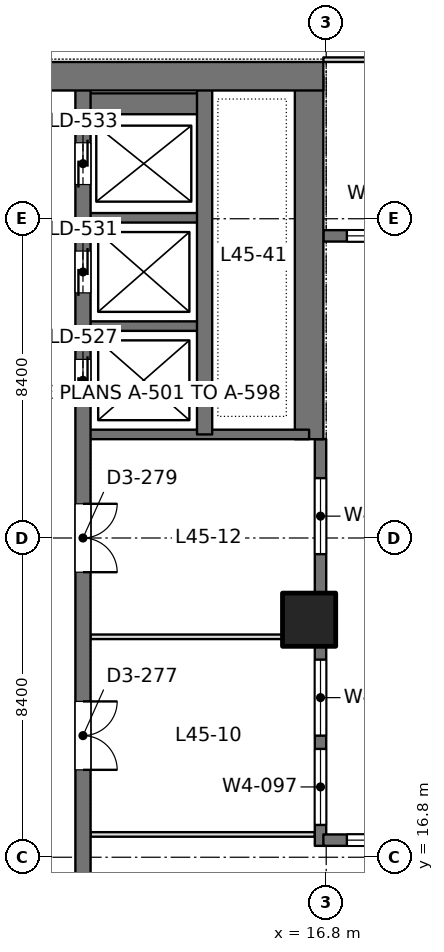
"""IFC4 building model, lengths in metres.
Left out: names, types, materials, properties, quantities, classifications, styles, units other than length and angle.
Written with IfcOpenShell. Run it as: python <this file> out.ifc"""

import sys

from ifc_helpers import new_model, si_unit, direction, frame, frame_2d, origin, origin_2d, place, context, subcontext, project, spatial, rectangle, extrude, element, fill, save


model = new_model("IFC4")
c1 = context("Model", 3, precision=1e-05, world=origin(), true_north=direction((0.0, 1.0)))
c2 = subcontext(c1, "Body", "Model", "MODEL_VIEW")
j1 = project(units=[si_unit("LENGTHUNIT", "METRE"), si_unit("PLANEANGLEUNIT", "RADIAN")], contexts=[c1])
p1 = place(None, origin())
s1 = spatial("IfcSite", under=j1, at=p1, CompositionType="ELEMENT")
p2 = place(p1, origin())
s2 = spatial("IfcBuilding", under=s1, at=p2, CompositionType="ELEMENT")
p3 = place(p2, frame((0.0, 0.0, 198.6)))
s3 = spatial("IfcBuildingStorey", under=s2, at=p3, CompositionType="ELEMENT", Elevation=198.6)
p4 = place(p3, frame((16.35, 23.05, 0.0), z_axis=(0.0, 0.0, 1.0), x_axis=(1.0, 0.0, 0.0)))
e1 = element("IfcColumn", 1, at=p4, inside=s3, PredefinedType="COLUMN", context=c2, shape_type="SweptSolid", body=[
    extrude(rectangle(XDim=1.4, YDim=1.4, at=origin_2d()), origin(), (0.0, 0.0, 1.0), 4.2),
])
p5 = place(p3, frame((-1.125, 37.35, 0.0), z_axis=(0.0, 0.0, 1.0), x_axis=(1.0, 0.0, 0.0)))
e2 = element("IfcWall", 2, at=p5, inside=s3, PredefinedType="SHEAR", context=c2, shape_type="SweptSolid", body=[
    extrude(rectangle(XDim=17.85, YDim=0.75, at=frame_2d((8.925, 0.0))), origin(), (0.0, 0.0, 1.0), 4.2),
])
p6 = place(p5, frame((8.875, 0.0, 0.0)))
e3 = element("IfcOpeningElement", 3, at=p6, cuts=e2, PredefinedType="OPENING", context=c2, shape_type="SweptSolid", body=[
    extrude(rectangle(XDim=1.8, YDim=2.4, at=frame_2d((0.9, 1.2))), frame((0.0, 0.385, 0.0), z_axis=(0.0, -1.0, 0.0), x_axis=(1.0, 0.0, 0.0)), (0.0, 0.0, 1.0), 0.77),
])
p7 = place(p3, frame((16.35, 27.8, 0.0), z_axis=(0.0, 0.0, 1.0), x_axis=(0.0, 1.0, 0.0)))
e4 = element("IfcWall", 4, at=p7, inside=s3, PredefinedType="SHEAR", context=c2, shape_type="SweptSolid", body=[
    extrude(rectangle(XDim=9.55, YDim=0.75, at=frame_2d((4.775, 0.0))), origin(), (0.0, 0.0, 1.0), 4.2),
])
p8 = place(p3, frame((10.4, 13.05, 0.0), z_axis=(0.0, 0.0, 1.0), x_axis=(0.0, 1.0, 0.0)))
e5 = element("IfcWall", 5, at=p8, inside=s3, PredefinedType="SHEAR", context=c2, shape_type="SweptSolid", body=[
    extrude(rectangle(XDim=24.3, YDim=0.4, at=frame_2d((12.15, 0.0))), origin(), (0.0, 0.0, 1.0), 4.2),
])
p9 = place(p8, frame((15.75, 0.0, 0.0)))
e6 = element("IfcOpeningElement", 6, at=p9, cuts=e5, PredefinedType="OPENING", context=c2, shape_type="SweptSolid", body=[
    extrude(rectangle(XDim=1.1, YDim=2.2, at=frame_2d((0.55, 1.1))), frame((0.0, 0.21, 0.0), z_axis=(0.0, -1.0, 0.0), x_axis=(1.0, 0.0, 0.0)), (0.0, 0.0, 1.0), 0.42),
])
p10 = place(p8, frame((18.6, 0.0, 0.0)))
e7 = element("IfcOpeningElement", 7, at=p10, cuts=e5, PredefinedType="OPENING", context=c2, shape_type="SweptSolid", body=[
    extrude(rectangle(XDim=1.1, YDim=2.2, at=frame_2d((0.55, 1.1))), frame((0.0, 0.21, 0.0), z_axis=(0.0, -1.0, 0.0), x_axis=(1.0, 0.0, 0.0)), (0.0, 0.0, 1.0), 0.42),
])
p11 = place(p8, frame((21.45, 0.0, 0.0)))
e8 = element("IfcOpeningElement", 8, at=p11, cuts=e5, PredefinedType="OPENING", context=c2, shape_type="SweptSolid", body=[
    extrude(rectangle(XDim=1.1, YDim=2.2, at=frame_2d((0.55, 1.1))), frame((0.0, 0.21, 0.0), z_axis=(0.0, -1.0, 0.0), x_axis=(1.0, 0.0, 0.0)), (0.0, 0.0, 1.0), 0.42),
])
p12 = place(p8, frame((6.05, 0.0, 0.0)))
e9 = element("IfcOpeningElement", 9, at=p12, cuts=e5, PredefinedType="OPENING", context=c2, shape_type="SweptSolid", body=[
    extrude(rectangle(XDim=1.8, YDim=2.4, at=frame_2d((0.9, 1.2))), frame((0.0, 0.21, 0.0), z_axis=(0.0, -1.0, 0.0), x_axis=(1.0, 0.0, 0.0)), (0.0, 0.0, 1.0), 0.42),
])
p13 = place(p8, frame((11.25, 0.0, 0.0)))
e10 = element("IfcOpeningElement", 10, at=p13, cuts=e5, PredefinedType="OPENING", context=c2, shape_type="SweptSolid", body=[
    extrude(rectangle(XDim=1.8, YDim=2.4, at=frame_2d((0.9, 1.2))), frame((0.0, 0.21, 0.0), z_axis=(0.0, -1.0, 0.0), x_axis=(1.0, 0.0, 0.0)), (0.0, 0.0, 1.0), 0.42),
])
p14 = place(p3, frame((13.6, 27.925, 0.0), z_axis=(0.0, 0.0, 1.0), x_axis=(0.0, 1.0, 0.0)))
e11 = element("IfcWall", 11, at=p14, inside=s3, PredefinedType="SHEAR", context=c2, shape_type="SweptSolid", body=[
    extrude(rectangle(XDim=9.425, YDim=0.4, at=frame_2d((4.712, 0.0))), origin(), (0.0, 0.0, 1.0), 4.2),
])
p15 = place(p3, frame((10.4, 27.925, 0.0), z_axis=(0.0, 0.0, 1.0), x_axis=(1.0, 0.0, 0.0)))
e12 = element("IfcWall", 12, at=p15, inside=s3, PredefinedType="SHEAR", context=c2, shape_type="SweptSolid", body=[
    extrude(rectangle(XDim=5.95, YDim=0.25, at=frame_2d((2.975, 0.0))), origin(), (0.0, 0.0, 1.0), 4.2),
])
for number, where, z_axis, x_axis in (
    (13, (10.4, 30.775, 0.0), (0.0, 0.0, 1.0), (1.0, 0.0, 0.0)),
    (14, (10.4, 33.625, 0.0), (0.0, 0.0, 1.0), (1.0, 0.0, 0.0)),
):
    element("IfcWall", number, at=place(p3, frame(where, z_axis=z_axis, x_axis=x_axis)), inside=s3, PredefinedType="SHEAR", context=c2, shape_type="SweptSolid", body=[
        extrude(rectangle(XDim=3.2, YDim=0.25, at=frame_2d((1.6, 0.0))), origin(), (0.0, 0.0, 1.0), 4.2),
    ])
p16 = place(p3, frame((10.4, 36.625, 0.0), z_axis=(0.0, 0.0, 1.0), x_axis=(1.0, 0.0, 0.0)))
e15 = element("IfcWall", 15, at=p16, inside=s3, PredefinedType="SHEAR", context=c2, shape_type="SweptSolid", body=[
    extrude(rectangle(XDim=3.2, YDim=0.55, at=frame_2d((1.6, 0.0))), origin(), (0.0, 0.0, 1.0), 4.2),
])
p17 = place(p3, frame((16.65, 17.1, 0.0), z_axis=(0.0, 0.0, 1.0), x_axis=(0.0, 1.0, 0.0)))
e16 = element("IfcWall", 16, at=p17, inside=s3, PredefinedType="SOLIDWALL", context=c2, shape_type="SweptSolid", body=[
    extrude(rectangle(XDim=10.7, YDim=0.3, at=frame_2d((5.35, 0.0))), origin(), (0.0, 0.0, 1.0), 4.05),
])
p18 = place(p17, frame((0.55, 0.0, 0.9)))
e17 = element("IfcOpeningElement", 17, at=p18, cuts=e16, PredefinedType="OPENING", context=c2, shape_type="SweptSolid", body=[
    extrude(rectangle(XDim=2.0, YDim=1.9, at=frame_2d((1.0, 0.95))), frame((0.0, 0.16, 0.0), z_axis=(0.0, -1.0, 0.0), x_axis=(1.0, 0.0, 0.0)), (0.0, 0.0, 1.0), 0.32),
])
p19 = place(p17, frame((2.9, 0.0, 0.9)))
e18 = element("IfcOpeningElement", 18, at=p19, cuts=e16, PredefinedType="OPENING", context=c2, shape_type="SweptSolid", body=[
    extrude(rectangle(XDim=2.0, YDim=1.9, at=frame_2d((1.0, 0.95))), frame((0.0, 0.16, 0.0), z_axis=(0.0, -1.0, 0.0), x_axis=(1.0, 0.0, 0.0)), (0.0, 0.0, 1.0), 0.32),
])
p20 = place(p17, frame((7.675, 0.0, 0.9)))
e19 = element("IfcOpeningElement", 19, at=p20, cuts=e16, PredefinedType="OPENING", context=c2, shape_type="SweptSolid", body=[
    extrude(rectangle(XDim=2.0, YDim=1.9, at=frame_2d((1.0, 0.95))), frame((0.0, 0.16, 0.0), z_axis=(0.0, -1.0, 0.0), x_axis=(1.0, 0.0, 0.0)), (0.0, 0.0, 1.0), 0.32),
])
p21 = place(p3, frame((16.725, 17.25, 0.0), z_axis=(0.0, 0.0, 1.0), x_axis=(1.0, 0.0, 0.0)))
e20 = element("IfcWall", 20, at=p21, inside=s3, PredefinedType="SOLIDWALL", context=c2, shape_type="SweptSolid", body=[
    extrude(rectangle(XDim=7.925, YDim=0.3, at=frame_2d((3.962, 0.0))), origin(), (0.0, 0.0, 1.0), 4.05),
])
p22 = place(p21, frame((0.619, 0.0, 0.9)))
e21 = element("IfcOpeningElement", 21, at=p22, cuts=e20, PredefinedType="OPENING", context=c2, shape_type="SweptSolid", body=[
    extrude(rectangle(XDim=2.0, YDim=1.9, at=frame_2d((1.0, 0.95))), frame((0.0, 0.16, 0.0), z_axis=(0.0, -1.0, 0.0), x_axis=(1.0, 0.0, 0.0)), (0.0, 0.0, 1.0), 0.32),
])
p23 = place(p21, frame((3.238, 0.0, 0.9)))
e22 = element("IfcOpeningElement", 22, at=p23, cuts=e20, PredefinedType="OPENING", context=c2, shape_type="SweptSolid", body=[
    extrude(rectangle(XDim=2.0, YDim=1.9, at=frame_2d((1.0, 0.95))), frame((0.0, 0.16, 0.0), z_axis=(0.0, -1.0, 0.0), x_axis=(1.0, 0.0, 0.0)), (0.0, 0.0, 1.0), 0.32),
])
p24 = place(p21, frame((5.856, 0.0, 0.9)))
e23 = element("IfcOpeningElement", 23, at=p24, cuts=e20, PredefinedType="OPENING", context=c2, shape_type="SweptSolid", body=[
    extrude(rectangle(XDim=2.0, YDim=1.9, at=frame_2d((1.0, 0.95))), frame((0.0, 0.16, 0.0), z_axis=(0.0, -1.0, 0.0), x_axis=(1.0, 0.0, 0.0)), (0.0, 0.0, 1.0), 0.32),
])
p25 = place(p3, frame((16.725, 33.15, 0.0), z_axis=(0.0, 0.0, 1.0), x_axis=(1.0, 0.0, 0.0)))
e24 = element("IfcWall", 24, at=p25, inside=s3, PredefinedType="SOLIDWALL", context=c2, shape_type="SweptSolid", body=[
    extrude(rectangle(XDim=7.925, YDim=0.3, at=frame_2d((3.962, 0.0))), origin(), (0.0, 0.0, 1.0), 4.05),
])
p26 = place(p25, frame((0.619, 0.0, 0.9)))
e25 = element("IfcOpeningElement", 25, at=p26, cuts=e24, PredefinedType="OPENING", context=c2, shape_type="SweptSolid", body=[
    extrude(rectangle(XDim=2.0, YDim=1.9, at=frame_2d((1.0, 0.95))), frame((0.0, 0.16, 0.0), z_axis=(0.0, -1.0, 0.0), x_axis=(1.0, 0.0, 0.0)), (0.0, 0.0, 1.0), 0.32),
])
p27 = place(p25, frame((3.238, 0.0, 0.9)))
e26 = element("IfcOpeningElement", 26, at=p27, cuts=e24, PredefinedType="OPENING", context=c2, shape_type="SweptSolid", body=[
    extrude(rectangle(XDim=2.0, YDim=1.9, at=frame_2d((1.0, 0.95))), frame((0.0, 0.16, 0.0), z_axis=(0.0, -1.0, 0.0), x_axis=(1.0, 0.0, 0.0)), (0.0, 0.0, 1.0), 0.32),
])
p28 = place(p25, frame((5.856, 0.0, 0.9)))
e27 = element("IfcOpeningElement", 27, at=p28, cuts=e24, PredefinedType="OPENING", context=c2, shape_type="SweptSolid", body=[
    extrude(rectangle(XDim=2.0, YDim=1.9, at=frame_2d((1.0, 0.95))), frame((0.0, 0.16, 0.0), z_axis=(0.0, -1.0, 0.0), x_axis=(1.0, 0.0, 0.0)), (0.0, 0.0, 1.0), 0.32),
])
p29 = place(p3, frame((10.598, 17.4, 0.0), z_axis=(0.0, 0.0, 1.0), x_axis=(1.0, 0.0, 0.0)))
e28 = element("IfcWall", 28, at=p29, inside=s3, PredefinedType="PARTITIONING", context=c2, shape_type="SweptSolid", body=[
    extrude(rectangle(XDim=5.904, YDim=0.12, at=frame_2d((2.952, 0.0))), origin(), (0.0, 0.0, 1.0), 3.55),
])
p30 = place(p3, frame((10.598, 22.6, 0.0), z_axis=(0.0, 0.0, 1.0), x_axis=(1.0, 0.0, 0.0)))
e29 = element("IfcWall", 29, at=p30, inside=s3, PredefinedType="PARTITIONING", context=c2, shape_type="SweptSolid", body=[
    extrude(rectangle(XDim=5.053, YDim=0.12, at=frame_2d((2.526, 0.0))), origin(), (0.0, 0.0, 1.0), 4.05),
])
p31 = place(p3, frame((16.725, 37.785, 0.0), z_axis=(0.0, 0.0, 1.0), x_axis=(1.0, 0.0, 0.0)))
e30 = element("IfcWall", 30, at=p31, inside=s3, PredefinedType="PARTITIONING", context=c2, shape_type="SweptSolid", body=[
    extrude(rectangle(XDim=16.95, YDim=0.12, at=frame_2d((8.475, 0.0))), origin(), (0.0, 0.0, 1.0), 3.55),
])
p32 = place(p31, frame((7.575, 0.0, 0.0)))
e31 = element("IfcOpeningElement", 31, at=p32, cuts=e30, PredefinedType="OPENING", context=c2, shape_type="SweptSolid", body=[
    extrude(rectangle(XDim=1.8, YDim=2.2, at=frame_2d((0.9, 1.1))), frame((0.0, 0.07, 0.0), z_axis=(0.0, -1.0, 0.0), x_axis=(1.0, 0.0, 0.0)), (0.0, 0.0, 1.0), 0.14),
])
p33 = place(p18, origin())
e32 = element("IfcWindow", 32, at=p33, inside=s3, PartitioningType="SINGLE_PANEL", PredefinedType="WINDOW", context=c2, shape_type="SweptSolid", body=[
    extrude(rectangle(XDim=2.0, YDim=1.9, at=frame_2d((1.0, 0.95))), frame((0.0, 0.03, 0.0), z_axis=(0.0, -1.0, 0.0), x_axis=(1.0, 0.0, 0.0)), (0.0, 0.0, 1.0), 0.06),
])
fill(e17, e32)
p34 = place(p19, origin())
e33 = element("IfcWindow", 33, at=p34, inside=s3, PartitioningType="SINGLE_PANEL", PredefinedType="WINDOW", context=c2, shape_type="SweptSolid", body=[
    extrude(rectangle(XDim=2.0, YDim=1.9, at=frame_2d((1.0, 0.95))), frame((0.0, 0.03, 0.0), z_axis=(0.0, -1.0, 0.0), x_axis=(1.0, 0.0, 0.0)), (0.0, 0.0, 1.0), 0.06),
])
fill(e18, e33)
p35 = place(p20, origin())
e34 = element("IfcWindow", 34, at=p35, inside=s3, PartitioningType="SINGLE_PANEL", PredefinedType="WINDOW", context=c2, shape_type="SweptSolid", body=[
    extrude(rectangle(XDim=2.0, YDim=1.9, at=frame_2d((1.0, 0.95))), frame((0.0, 0.03, 0.0), z_axis=(0.0, -1.0, 0.0), x_axis=(1.0, 0.0, 0.0)), (0.0, 0.0, 1.0), 0.06),
])
fill(e19, e34)
p36 = place(p22, origin())
e35 = element("IfcWindow", 35, at=p36, inside=s3, PartitioningType="SINGLE_PANEL", PredefinedType="WINDOW", context=c2, shape_type="SweptSolid", body=[
    extrude(rectangle(XDim=2.0, YDim=1.9, at=frame_2d((1.0, 0.95))), frame((0.0, 0.03, 0.0), z_axis=(0.0, -1.0, 0.0), x_axis=(1.0, 0.0, 0.0)), (0.0, 0.0, 1.0), 0.06),
])
fill(e21, e35)
p37 = place(p26, origin())
e36 = element("IfcWindow", 36, at=p37, inside=s3, PartitioningType="SINGLE_PANEL", PredefinedType="WINDOW", context=c2, shape_type="SweptSolid", body=[
    extrude(rectangle(XDim=2.0, YDim=1.9, at=frame_2d((1.0, 0.95))), frame((0.0, 0.03, 0.0), z_axis=(0.0, -1.0, 0.0), x_axis=(1.0, 0.0, 0.0)), (0.0, 0.0, 1.0), 0.06),
])
fill(e25, e36)
p38 = place(p9, origin())
e37 = element("IfcDoor", 37, at=p38, inside=s3, OperationType="DOUBLE_DOOR_SLIDING", PredefinedType="DOOR", context=c2, shape_type="SweptSolid", body=[
    extrude(rectangle(XDim=1.1, YDim=2.2, at=frame_2d((0.55, 1.1))), frame((0.0, 0.025, 0.0), z_axis=(0.0, -1.0, 0.0), x_axis=(1.0, 0.0, 0.0)), (0.0, 0.0, 1.0), 0.05),
])
fill(e6, e37)
p39 = place(p10, origin())
e38 = element("IfcDoor", 38, at=p39, inside=s3, OperationType="DOUBLE_DOOR_SLIDING", PredefinedType="DOOR", context=c2, shape_type="SweptSolid", body=[
    extrude(rectangle(XDim=1.1, YDim=2.2, at=frame_2d((0.55, 1.1))), frame((0.0, 0.025, 0.0), z_axis=(0.0, -1.0, 0.0), x_axis=(1.0, 0.0, 0.0)), (0.0, 0.0, 1.0), 0.05),
])
fill(e7, e38)
p40 = place(p11, origin())
e39 = element("IfcDoor", 39, at=p40, inside=s3, OperationType="DOUBLE_DOOR_SLIDING", PredefinedType="DOOR", context=c2, shape_type="SweptSolid", body=[
    extrude(rectangle(XDim=1.1, YDim=2.2, at=frame_2d((0.55, 1.1))), frame((0.0, 0.025, 0.0), z_axis=(0.0, -1.0, 0.0), x_axis=(1.0, 0.0, 0.0)), (0.0, 0.0, 1.0), 0.05),
])
fill(e8, e39)
p41 = place(p12, frame((1.8, 0.0, 0.0), z_axis=(0.0, 0.0, 1.0), x_axis=(-1.0, 0.0, 0.0)))
e40 = element("IfcDoor", 40, at=p41, inside=s3, OperationType="DOUBLE_DOOR_SINGLE_SWING", PredefinedType="DOOR", context=c2, shape_type="SweptSolid", body=[
    extrude(rectangle(XDim=1.8, YDim=2.4, at=frame_2d((0.9, 1.2))), frame((0.0, 0.025, 0.0), z_axis=(0.0, -1.0, 0.0), x_axis=(1.0, 0.0, 0.0)), (0.0, 0.0, 1.0), 0.05),
])
fill(e9, e40)
p42 = place(p13, frame((1.8, 0.0, 0.0), z_axis=(0.0, 0.0, 1.0), x_axis=(-1.0, 0.0, 0.0)))
e41 = element("IfcDoor", 41, at=p42, inside=s3, OperationType="DOUBLE_DOOR_SINGLE_SWING", PredefinedType="DOOR", context=c2, shape_type="SweptSolid", body=[
    extrude(rectangle(XDim=1.8, YDim=2.4, at=frame_2d((0.9, 1.2))), frame((0.0, 0.025, 0.0), z_axis=(0.0, -1.0, 0.0), x_axis=(1.0, 0.0, 0.0)), (0.0, 0.0, 1.0), 0.05),
])
fill(e10, e41)
save(model, sys.argv[1])
